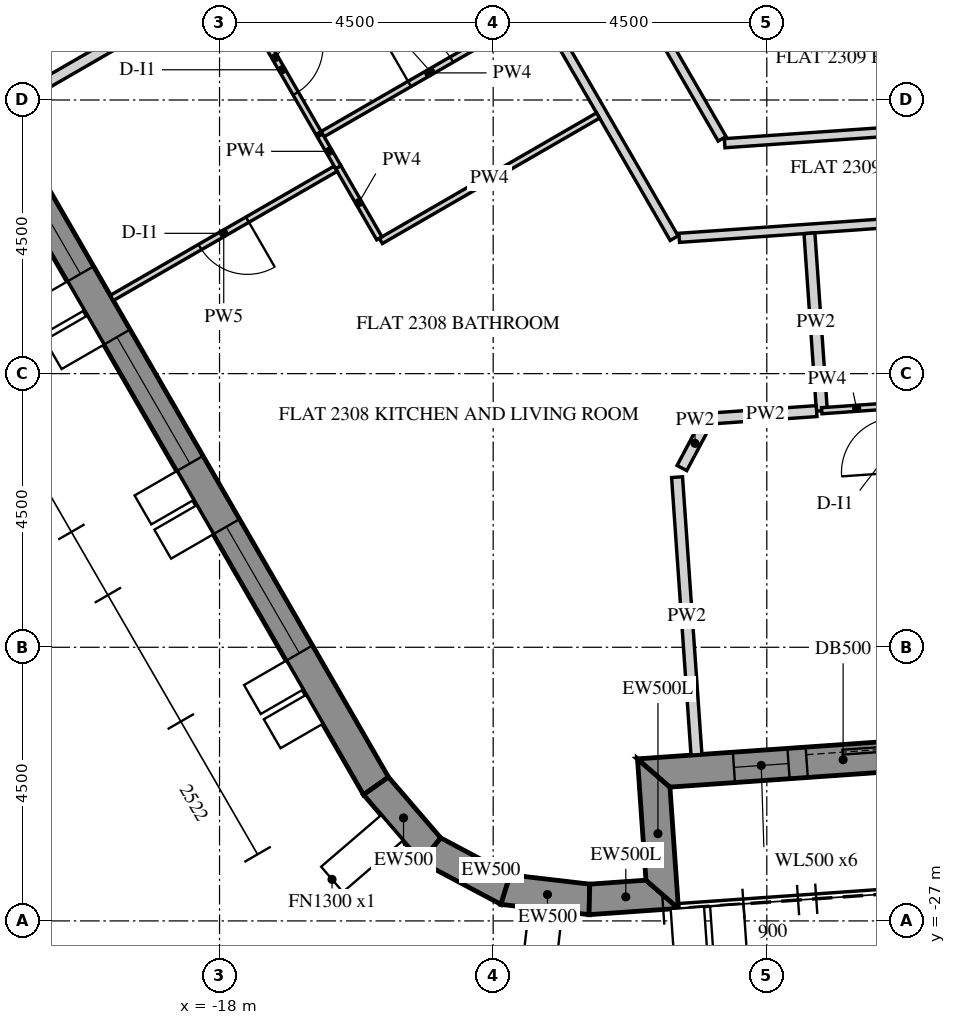
"""IFC4 building model, lengths in metres.
Left out: names, types, materials, properties, quantities, classifications, styles, units other than length and angle.
Written with IfcOpenShell. Run it as: python <this file> out.ifc"""

import sys

from ifc_helpers import new_model, si_unit, direction, frame, frame_2d, origin, place, context, subcontext, project, spatial, polyline, rectangle, outline, extrude, element, fill, save


model = new_model("IFC4")
c1 = context("Model", 3, precision=1e-05, world=origin(), true_north=direction((0.0, 1.0)))
c2 = subcontext(c1, "Body", "Model", "MODEL_VIEW")
j1 = project(units=[si_unit("LENGTHUNIT", "METRE"), si_unit("PLANEANGLEUNIT", "RADIAN")], contexts=[c1])
p1 = place(None, origin())
s1 = spatial("IfcSite", under=j1, at=p1, CompositionType="ELEMENT")
p2 = place(p1, origin())
s2 = spatial("IfcBuilding", under=s1, at=p2, CompositionType="ELEMENT")
p3 = place(p2, frame((0.0, 0.0, 291.3)))
s3 = spatial("IfcBuildingStorey", under=s2, at=p3, CompositionType="ELEMENT", Elevation=291.3)
p4 = place(p3, frame((-28.149, -2.745, -0.15), z_axis=(0.0, 0.0, 1.0), x_axis=(0.500003737743, -0.866023245787, 0.0)))
e1 = element("IfcWall", 1, at=p4, inside=s3, PredefinedType="SOLIDWALL", context=c2, shape_type="SweptSolid", body=[
    extrude(outline(polyline([(-0.021, -0.25), (25.468, -0.25), (25.421, 0.25), (0.021, 0.25), (-0.021, -0.25)])), origin(), (0.0, 0.0, 1.0), 3.9),
])
p5 = place(p4, frame((2.522, 0.0, 0.75)))
e2 = element("IfcOpeningElement", 2, at=p5, cuts=e1, PredefinedType="OPENING", context=c2, shape_type="SweptSolid", body=[
    extrude(rectangle(XDim=2.4, YDim=2.7, at=frame_2d((1.2, 1.35))), frame((0.0, 0.26, 0.0), z_axis=(0.0, -1.0, 0.0), x_axis=(1.0, 0.0, 0.0)), (0.0, 0.0, 1.0), 0.52),
])
p6 = place(p4, frame((6.122, 0.0, 0.75)))
e3 = element("IfcOpeningElement", 3, at=p6, cuts=e1, PredefinedType="OPENING", context=c2, shape_type="SweptSolid", body=[
    extrude(rectangle(XDim=2.4, YDim=2.7, at=frame_2d((1.2, 1.35))), frame((0.0, 0.26, 0.0), z_axis=(0.0, -1.0, 0.0), x_axis=(1.0, 0.0, 0.0)), (0.0, 0.0, 1.0), 0.52),
])
p7 = place(p4, frame((9.722, 0.0, 0.75)))
e4 = element("IfcOpeningElement", 4, at=p7, cuts=e1, PredefinedType="OPENING", context=c2, shape_type="SweptSolid", body=[
    extrude(rectangle(XDim=2.4, YDim=2.7, at=frame_2d((1.2, 1.35))), frame((0.0, 0.26, 0.0), z_axis=(0.0, -1.0, 0.0), x_axis=(1.0, 0.0, 0.0)), (0.0, 0.0, 1.0), 0.52),
])
p8 = place(p4, frame((13.323, 0.0, 0.75)))
e5 = element("IfcOpeningElement", 5, at=p8, cuts=e1, PredefinedType="OPENING", context=c2, shape_type="SweptSolid", body=[
    extrude(rectangle(XDim=2.4, YDim=2.7, at=frame_2d((1.2, 1.35))), frame((0.0, 0.26, 0.0), z_axis=(0.0, -1.0, 0.0), x_axis=(1.0, 0.0, 0.0)), (0.0, 0.0, 1.0), 0.52),
])
p9 = place(p4, frame((16.922, 0.0, 0.75)))
e6 = element("IfcOpeningElement", 6, at=p9, cuts=e1, PredefinedType="OPENING", context=c2, shape_type="SweptSolid", body=[
    extrude(rectangle(XDim=2.4, YDim=2.7, at=frame_2d((1.2, 1.35))), frame((0.0, 0.26, 0.0), z_axis=(0.0, -1.0, 0.0), x_axis=(1.0, 0.0, 0.0)), (0.0, 0.0, 1.0), 0.52),
])
p10 = place(p4, frame((20.522, 0.0, 0.75)))
e7 = element("IfcOpeningElement", 7, at=p10, cuts=e1, PredefinedType="OPENING", context=c2, shape_type="SweptSolid", body=[
    extrude(rectangle(XDim=2.4, YDim=2.7, at=frame_2d((1.2, 1.35))), frame((0.0, 0.26, 0.0), z_axis=(0.0, -1.0, 0.0), x_axis=(1.0, 0.0, 0.0)), (0.0, 0.0, 1.0), 0.52),
])
p11 = place(p3, frame((-15.427, -24.78, -0.15), z_axis=(0.0, 0.0, 1.0), x_axis=(0.651616566281, -0.758548515619, 0.0)))
e8 = element("IfcWall", 8, at=p11, inside=s3, PredefinedType="SOLIDWALL", context=c2, shape_type="SweptSolid", body=[
    extrude(outline(polyline([(-0.023, -0.25), (1.435, -0.25), (1.341, 0.25), (0.023, 0.25), (-0.023, -0.25)])), origin(), (0.0, 0.0, 1.0), 3.9),
])
p12 = place(p3, frame((-14.522, -25.833, -0.15), z_axis=(0.0, 0.0, 1.0), x_axis=(0.882926676147, -0.469510899286, 0.0)))
e9 = element("IfcWall", 9, at=p12, inside=s3, PredefinedType="SOLIDWALL", context=c2, shape_type="SweptSolid", body=[
    extrude(outline(polyline([(-0.047, -0.25), (1.436, -0.25), (1.341, 0.25), (0.047, 0.25), (-0.047, -0.25)])), origin(), (0.0, 0.0, 1.0), 3.9),
])
p13 = place(p3, frame((-13.296, -26.485, -0.15), z_axis=(0.0, 0.0, 1.0), x_axis=(0.993239161627, -0.116086036245, 0.0)))
e10 = element("IfcWall", 10, at=p13, inside=s3, PredefinedType="SOLIDWALL", context=c2, shape_type="SweptSolid", body=[
    extrude(outline(polyline([(-0.047, -0.25), (1.411, -0.25), (1.365, 0.25), (0.047, 0.25), (-0.047, -0.25)])), origin(), (0.0, 0.0, 1.0), 3.9),
])
p14 = place(p3, frame((-11.917, -26.646, -0.15), z_axis=(0.0, 0.0, 1.0), x_axis=(0.997562933087, 0.069772448216, 0.0)))
e11 = element("IfcWall", 11, at=p14, inside=s3, PredefinedType="SOLIDWALL", context=c2, shape_type="SweptSolid", body=[
    extrude(outline(polyline([(-0.023, -0.25), (1.45, -0.25), (0.95, 0.25), (0.023, 0.25), (-0.023, -0.25)])), origin(), (0.0, 0.0, 1.0), 3.9),
])
p15 = place(p3, frame((-10.72, -26.562, -0.15), z_axis=(0.0, 0.0, 1.0), x_axis=(-0.069824268692, 0.99755930726, 0.0)))
e12 = element("IfcWall", 12, at=p15, inside=s3, PredefinedType="SOLIDWALL", context=c2, shape_type="SweptSolid", body=[
    extrude(outline(polyline([(-0.25, -0.25), (1.75, -0.25), (2.25, 0.25), (0.25, 0.25), (-0.25, -0.25)])), origin(), (0.0, 0.0, 1.0), 3.9),
])
p16 = place(p3, frame((-10.86, -24.567, -0.15), z_axis=(0.0, 0.0, 1.0), x_axis=(0.997564329317, 0.06975248292, 0.0)))
e13 = element("IfcWall", 13, at=p16, inside=s3, PredefinedType="SOLIDWALL", context=c2, shape_type="SweptSolid", body=[
    extrude(outline(polyline([(0.25, -0.25), (22.795, -0.25), (23.295, 0.25), (-0.25, 0.25), (0.25, -0.25)])), origin(), (0.0, 0.0, 1.0), 3.9),
])
p17 = place(p16, frame((1.323, 0.0, 1.05)))
e14 = element("IfcOpeningElement", 14, at=p17, cuts=e13, PredefinedType="OPENING", context=c2, shape_type="SweptSolid", body=[
    extrude(rectangle(XDim=0.9, YDim=1.5, at=frame_2d((0.45, 0.75))), frame((0.0, 0.26, 0.0), z_axis=(0.0, -1.0, 0.0), x_axis=(1.0, 0.0, 0.0)), (0.0, 0.0, 1.0), 0.52),
])
p18 = place(p16, frame((2.522, 0.0, 0.15)))
e15 = element("IfcOpeningElement", 15, at=p18, cuts=e13, PredefinedType="OPENING", context=c2, shape_type="SweptSolid", body=[
    extrude(rectangle(XDim=1.2, YDim=2.4, at=frame_2d((0.6, 1.2))), frame((0.0, 0.26, 0.0), z_axis=(0.0, -1.0, 0.0), x_axis=(1.0, 0.0, 0.0)), (0.0, 0.0, 1.0), 0.52),
])
p19 = place(p16, frame((4.922, 0.0, 1.05)))
e16 = element("IfcOpeningElement", 16, at=p19, cuts=e13, PredefinedType="OPENING", context=c2, shape_type="SweptSolid", body=[
    extrude(rectangle(XDim=0.9, YDim=1.5, at=frame_2d((0.45, 0.75))), frame((0.0, 0.26, 0.0), z_axis=(0.0, -1.0, 0.0), x_axis=(1.0, 0.0, 0.0)), (0.0, 0.0, 1.0), 0.52),
])
p20 = place(p16, frame((6.122, 0.0, 0.15)))
e17 = element("IfcOpeningElement", 17, at=p20, cuts=e13, PredefinedType="OPENING", context=c2, shape_type="SweptSolid", body=[
    extrude(rectangle(XDim=1.2, YDim=2.4, at=frame_2d((0.6, 1.2))), frame((0.0, 0.26, 0.0), z_axis=(0.0, -1.0, 0.0), x_axis=(1.0, 0.0, 0.0)), (0.0, 0.0, 1.0), 0.52),
])
p21 = place(p16, frame((8.522, 0.0, 1.05)))
e18 = element("IfcOpeningElement", 18, at=p21, cuts=e13, PredefinedType="OPENING", context=c2, shape_type="SweptSolid", body=[
    extrude(rectangle(XDim=0.9, YDim=1.5, at=frame_2d((0.45, 0.75))), frame((0.0, 0.26, 0.0), z_axis=(0.0, -1.0, 0.0), x_axis=(1.0, 0.0, 0.0)), (0.0, 0.0, 1.0), 0.52),
])
p22 = place(p16, frame((9.722, 0.0, 0.15)))
e19 = element("IfcOpeningElement", 19, at=p22, cuts=e13, PredefinedType="OPENING", context=c2, shape_type="SweptSolid", body=[
    extrude(rectangle(XDim=1.2, YDim=2.4, at=frame_2d((0.6, 1.2))), frame((0.0, 0.26, 0.0), z_axis=(0.0, -1.0, 0.0), x_axis=(1.0, 0.0, 0.0)), (0.0, 0.0, 1.0), 0.52),
])
p23 = place(p16, frame((12.122, 0.0, 1.05)))
e20 = element("IfcOpeningElement", 20, at=p23, cuts=e13, PredefinedType="OPENING", context=c2, shape_type="SweptSolid", body=[
    extrude(rectangle(XDim=0.9, YDim=1.5, at=frame_2d((0.45, 0.75))), frame((0.0, 0.26, 0.0), z_axis=(0.0, -1.0, 0.0), x_axis=(1.0, 0.0, 0.0)), (0.0, 0.0, 1.0), 0.52),
])
p24 = place(p16, frame((13.323, 0.0, 0.15)))
e21 = element("IfcOpeningElement", 21, at=p24, cuts=e13, PredefinedType="OPENING", context=c2, shape_type="SweptSolid", body=[
    extrude(rectangle(XDim=1.2, YDim=2.4, at=frame_2d((0.6, 1.2))), frame((0.0, 0.26, 0.0), z_axis=(0.0, -1.0, 0.0), x_axis=(1.0, 0.0, 0.0)), (0.0, 0.0, 1.0), 0.52),
])
p25 = place(p16, frame((15.722, 0.0, 1.05)))
e22 = element("IfcOpeningElement", 22, at=p25, cuts=e13, PredefinedType="OPENING", context=c2, shape_type="SweptSolid", body=[
    extrude(rectangle(XDim=0.9, YDim=1.5, at=frame_2d((0.45, 0.75))), frame((0.0, 0.26, 0.0), z_axis=(0.0, -1.0, 0.0), x_axis=(1.0, 0.0, 0.0)), (0.0, 0.0, 1.0), 0.52),
])
p26 = place(p16, frame((16.922, 0.0, 0.15)))
e23 = element("IfcOpeningElement", 23, at=p26, cuts=e13, PredefinedType="OPENING", context=c2, shape_type="SweptSolid", body=[
    extrude(rectangle(XDim=1.2, YDim=2.4, at=frame_2d((0.6, 1.2))), frame((0.0, 0.26, 0.0), z_axis=(0.0, -1.0, 0.0), x_axis=(1.0, 0.0, 0.0)), (0.0, 0.0, 1.0), 0.52),
])
p27 = place(p16, frame((19.323, 0.0, 1.05)))
e24 = element("IfcOpeningElement", 24, at=p27, cuts=e13, PredefinedType="OPENING", context=c2, shape_type="SweptSolid", body=[
    extrude(rectangle(XDim=0.9, YDim=1.5, at=frame_2d((0.45, 0.75))), frame((0.0, 0.26, 0.0), z_axis=(0.0, -1.0, 0.0), x_axis=(1.0, 0.0, 0.0)), (0.0, 0.0, 1.0), 0.52),
])
p28 = place(p16, frame((20.522, 0.0, 0.15)))
e25 = element("IfcOpeningElement", 25, at=p28, cuts=e13, PredefinedType="OPENING", context=c2, shape_type="SweptSolid", body=[
    extrude(rectangle(XDim=1.2, YDim=2.4, at=frame_2d((0.6, 1.2))), frame((0.0, 0.26, 0.0), z_axis=(0.0, -1.0, 0.0), x_axis=(1.0, 0.0, 0.0)), (0.0, 0.0, 1.0), 0.52),
])
p29 = place(p3, frame((-17.998, -2.826, 0.0), z_axis=(0.0, 0.0, 1.0), x_axis=(0.500003306199, -0.866023494941, 0.0)))
e26 = element("IfcWall", 26, at=p29, inside=s3, PredefinedType="PARTITIONING", context=c2, shape_type="SweptSolid", body=[
    extrude(rectangle(XDim=14.949, YDim=0.15, at=frame_2d((7.475, 0.0))), origin(), (0.0, 0.0, 1.0), 2.988),
])
p30 = place(p29, frame((2.725, 0.0, 0.0)))
e27 = element("IfcOpeningElement", 27, at=p30, cuts=e26, PredefinedType="OPENING", context=c2, shape_type="SweptSolid", body=[
    extrude(rectangle(XDim=1.0, YDim=2.1, at=frame_2d((0.5, 1.05))), frame((0.0, 0.085, 0.0), z_axis=(0.0, -1.0, 0.0), x_axis=(1.0, 0.0, 0.0)), (0.0, 0.0, 1.0), 0.17),
])
p31 = place(p29, frame((8.576, 0.0, 0.0)))
e28 = element("IfcOpeningElement", 28, at=p31, cuts=e26, PredefinedType="OPENING", context=c2, shape_type="SweptSolid", body=[
    extrude(rectangle(XDim=1.0, YDim=2.1, at=frame_2d((0.5, 1.05))), frame((0.0, 0.085, 0.0), z_axis=(0.0, -1.0, 0.0), x_axis=(1.0, 0.0, 0.0)), (0.0, 0.0, 1.0), 0.17),
])
p32 = place(p3, frame((-10.44, -15.767, 0.0), z_axis=(0.0, 0.0, 1.0), x_axis=(0.997534721961, 0.070174628483, 0.0)))
e29 = element("IfcWall", 29, at=p32, inside=s3, PredefinedType="PARTITIONING", context=c2, shape_type="SweptSolid", body=[
    extrude(rectangle(XDim=16.939, YDim=0.15, at=frame_2d((8.47, 0.0))), origin(), (0.0, 0.0, 1.0), 2.988),
])
p33 = place(p32, frame((4.742, 0.0, 0.0)))
e30 = element("IfcOpeningElement", 30, at=p33, cuts=e29, PredefinedType="OPENING", context=c2, shape_type="SweptSolid", body=[
    extrude(rectangle(XDim=1.0, YDim=2.1, at=frame_2d((0.5, 1.05))), frame((0.0, 0.085, 0.0), z_axis=(0.0, -1.0, 0.0), x_axis=(1.0, 0.0, 0.0)), (0.0, 0.0, 1.0), 0.17),
])
p34 = place(p3, frame((6.884, -13.052, 0.0), z_axis=(0.0, 0.0, 1.0), x_axis=(-0.997564224443, -0.069753982764, 0.0)))
e31 = element("IfcWall", 31, at=p34, inside=s3, PredefinedType="PARTITIONING", context=c2, shape_type="SweptSolid", body=[
    extrude(rectangle(XDim=16.618, YDim=0.15, at=frame_2d((8.309, 0.0))), origin(), (0.0, 0.0, 1.0), 2.988),
])
p35 = place(p34, frame((7.859, 0.0, 0.0)))
e32 = element("IfcOpeningElement", 32, at=p35, cuts=e31, PredefinedType="OPENING", context=c2, shape_type="SweptSolid", body=[
    extrude(rectangle(XDim=0.9, YDim=2.1, at=frame_2d((0.45, 1.05))), frame((0.0, 0.085, 0.0), z_axis=(0.0, -1.0, 0.0), x_axis=(1.0, 0.0, 0.0)), (0.0, 0.0, 1.0), 0.17),
])
p36 = place(p3, frame((-9.735, -14.138, 0.0), z_axis=(0.0, 0.0, 1.0), x_axis=(-0.500018385592, 0.866014788598, 0.0)))
e33 = element("IfcWall", 33, at=p36, inside=s3, PredefinedType="PARTITIONING", context=c2, shape_type="SweptSolid", body=[
    extrude(rectangle(XDim=6.356, YDim=0.15, at=frame_2d((3.178, 0.0))), origin(), (0.0, 0.0, 1.0), 2.988),
])
p37 = place(p3, frame((-21.571, -13.637, 0.0), z_axis=(0.0, 0.0, 1.0), x_axis=(0.866034063461, 0.499985000701, 0.0)))
e34 = element("IfcWall", 34, at=p37, inside=s3, PredefinedType="PARTITIONING", context=c2, shape_type="SweptSolid", body=[
    extrude(rectangle(XDim=8.425, YDim=0.18, at=frame_2d((4.212, 0.0))), origin(), (0.0, 0.0, 1.0), 2.988),
])
p38 = place(p3, frame((-11.775, -13.755, 0.0), z_axis=(0.0, 0.0, 1.0), x_axis=(-0.866034795751, -0.499983732284, 0.0)))
e35 = element("IfcWall", 35, at=p38, inside=s3, PredefinedType="PARTITIONING", context=c2, shape_type="SweptSolid", body=[
    extrude(rectangle(XDim=4.125, YDim=0.1, at=frame_2d((2.062, 0.0))), origin(), (0.0, 0.0, 1.0), 2.988),
])
p39 = place(p3, frame((-15.372, -15.774, 0.0), z_axis=(0.0, 0.0, 1.0), x_axis=(-0.500003806764, 0.866023205937, 0.0)))
e36 = element("IfcWall", 36, at=p39, inside=s3, PredefinedType="PARTITIONING", context=c2, shape_type="SweptSolid", body=[
    extrude(rectangle(XDim=1.352, YDim=0.1, at=frame_2d((0.676, 0.0))), origin(), (0.0, 0.0, 1.0), 2.988),
])
p40 = place(p3, frame((-16.091, -14.63, 0.0), z_axis=(0.0, 0.0, 1.0), x_axis=(-0.866028703517, -0.499994284652, 0.0)))
e37 = element("IfcWall", 37, at=p40, inside=s3, PredefinedType="PARTITIONING", context=c2, shape_type="SweptSolid", body=[
    extrude(rectangle(XDim=4.25, YDim=0.1, at=frame_2d((2.125, 0.0))), origin(), (0.0, 0.0, 1.0), 2.988),
])
p41 = place(p40, frame((1.675, 0.0, 0.0)))
e38 = element("IfcOpeningElement", 38, at=p41, cuts=e37, PredefinedType="OPENING", context=c2, shape_type="SweptSolid", body=[
    extrude(rectangle(XDim=0.9, YDim=2.1, at=frame_2d((0.45, 1.05))), frame((0.0, 0.06, 0.0), z_axis=(0.0, -1.0, 0.0), x_axis=(1.0, 0.0, 0.0)), (0.0, 0.0, 1.0), 0.12),
])
p42 = place(p3, frame((-8.094, -18.61, 0.0), z_axis=(0.0, 0.0, 1.0), x_axis=(-0.069781781132, 0.997562280272, 0.0)))
e39 = element("IfcWall", 39, at=p42, inside=s3, PredefinedType="PARTITIONING", context=c2, shape_type="SweptSolid", body=[
    extrude(rectangle(XDim=2.925, YDim=0.18, at=frame_2d((1.462, 0.0))), origin(), (0.0, 0.0, 1.0), 2.988),
])
p43 = place(p3, frame((-10.157, -24.268, 0.0), z_axis=(0.0, 0.0, 1.0), x_axis=(-0.069722955951, 0.997566393486, 0.0)))
e40 = element("IfcWall", 40, at=p43, inside=s3, PredefinedType="PARTITIONING", context=c2, shape_type="SweptSolid", body=[
    extrude(rectangle(XDim=4.577, YDim=0.18, at=frame_2d((2.288, 0.0))), origin(), (0.0, 0.0, 1.0), 2.988),
])
p44 = place(p3, frame((-10.396, -19.552, 0.0), z_axis=(0.0, 0.0, 1.0), x_axis=(0.469595353143, 0.882881761226, 0.0)))
e41 = element("IfcWall", 41, at=p44, inside=s3, PredefinedType="PARTITIONING", context=c2, shape_type="SweptSolid", body=[
    extrude(rectangle(XDim=0.919, YDim=0.18, at=frame_2d((0.459, 0.0))), origin(), (0.0, 0.0, 1.0), 2.988),
])
p45 = place(p3, frame((-9.859, -18.733, 0.0), z_axis=(0.0, 0.0, 1.0), x_axis=(0.997559371599, 0.069823349496, 0.0)))
e42 = element("IfcWall", 42, at=p45, inside=s3, PredefinedType="PARTITIONING", context=c2, shape_type="SweptSolid", body=[
    extrude(rectangle(XDim=1.682, YDim=0.18, at=frame_2d((0.841, 0.0))), origin(), (0.0, 0.0, 1.0), 2.988),
])
p46 = place(p3, frame((-16.347, -14.085, 0.0), z_axis=(0.0, 0.0, 1.0), x_axis=(0.866034795751, 0.499983732284, 0.0)))
e43 = element("IfcWall", 43, at=p46, inside=s3, PredefinedType="PARTITIONING", context=c2, shape_type="SweptSolid", body=[
    extrude(rectangle(XDim=4.125, YDim=0.1, at=frame_2d((2.062, 0.0))), origin(), (0.0, 0.0, 1.0), 2.988),
])
p47 = place(p46, frame((1.7, 0.0, 0.0)))
e44 = element("IfcOpeningElement", 44, at=p47, cuts=e43, PredefinedType="OPENING", context=c2, shape_type="SweptSolid", body=[
    extrude(rectangle(XDim=0.8, YDim=2.1, at=frame_2d((0.4, 1.05))), frame((0.0, 0.06, 0.0), z_axis=(0.0, -1.0, 0.0), x_axis=(1.0, 0.0, 0.0)), (0.0, 0.0, 1.0), 0.12),
])
p48 = place(p3, frame((-17.802, -11.565, 0.0), z_axis=(0.0, 0.0, 1.0), x_axis=(0.499983369373, -0.866035005268, 0.0)))
e45 = element("IfcWall", 45, at=p48, inside=s3, PredefinedType="PARTITIONING", context=c2, shape_type="SweptSolid", body=[
    extrude(rectangle(XDim=2.862, YDim=0.1, at=frame_2d((1.431, 0.0))), origin(), (0.0, 0.0, 1.0), 2.988),
])
p49 = place(p48, frame((0.15, 0.0, 0.0)))
e46 = element("IfcOpeningElement", 46, at=p49, cuts=e45, PredefinedType="OPENING", context=c2, shape_type="SweptSolid", body=[
    extrude(rectangle(XDim=0.9, YDim=2.1, at=frame_2d((0.45, 1.05))), frame((0.0, 0.06, 0.0), z_axis=(0.0, -1.0, 0.0), x_axis=(1.0, 0.0, 0.0)), (0.0, 0.0, 1.0), 0.12),
])
p50 = place(p48, frame((1.21, 0.0, 0.0)))
e47 = element("IfcOpeningElement", 47, at=p50, cuts=e45, PredefinedType="OPENING", context=c2, shape_type="SweptSolid", body=[
    extrude(rectangle(XDim=0.9, YDim=2.1, at=frame_2d((0.45, 1.05))), frame((0.0, 0.06, 0.0), z_axis=(0.0, -1.0, 0.0), x_axis=(1.0, 0.0, 0.0)), (0.0, 0.0, 1.0), 0.12),
])
p51 = place(p3, frame((-16.348, -14.084, 0.0), z_axis=(0.0, 0.0, 1.0), x_axis=(0.499933044277, -0.866064057238, 0.0)))
e48 = element("IfcWall", 48, at=p51, inside=s3, PredefinedType="PARTITIONING", context=c2, shape_type="SweptSolid", body=[
    extrude(rectangle(XDim=0.602, YDim=0.1, at=frame_2d((0.301, 0.0))), origin(), (0.0, 0.0, 1.0), 2.988),
])
p52 = place(p3, frame((-8.097, -18.61, 0.0), z_axis=(0.0, 0.0, 1.0), x_axis=(0.99756000175, 0.069814346006, 0.0)))
e49 = element("IfcWall", 49, at=p52, inside=s3, PredefinedType="PARTITIONING", context=c2, shape_type="SweptSolid", body=[
    extrude(rectangle(XDim=1.15, YDim=0.1, at=frame_2d((0.575, 0.0))), origin(), (0.0, 0.0, 1.0), 2.988),
])
p53 = place(p8, frame((0.0, 0.18, 0.0)))
e50 = element("IfcWindow", 50, at=p53, inside=s3, PartitioningType="DOUBLE_PANEL_VERTICAL", PredefinedType="WINDOW", context=c2, shape_type="SweptSolid", body=[
    extrude(rectangle(XDim=2.4, YDim=2.7, at=frame_2d((1.2, 1.35))), frame((0.0, 0.03, 0.0), z_axis=(0.0, -1.0, 0.0), x_axis=(1.0, 0.0, 0.0)), (0.0, 0.0, 1.0), 0.06),
])
fill(e5, e50)
p54 = place(p9, frame((0.0, 0.18, 0.0)))
e51 = element("IfcWindow", 51, at=p54, inside=s3, PartitioningType="DOUBLE_PANEL_VERTICAL", PredefinedType="WINDOW", context=c2, shape_type="SweptSolid", body=[
    extrude(rectangle(XDim=2.4, YDim=2.7, at=frame_2d((1.2, 1.35))), frame((0.0, 0.03, 0.0), z_axis=(0.0, -1.0, 0.0), x_axis=(1.0, 0.0, 0.0)), (0.0, 0.0, 1.0), 0.06),
])
fill(e6, e51)
p55 = place(p10, frame((0.0, 0.18, 0.0)))
e52 = element("IfcWindow", 52, at=p55, inside=s3, PartitioningType="DOUBLE_PANEL_VERTICAL", PredefinedType="WINDOW", context=c2, shape_type="SweptSolid", body=[
    extrude(rectangle(XDim=2.4, YDim=2.7, at=frame_2d((1.2, 1.35))), frame((0.0, 0.03, 0.0), z_axis=(0.0, -1.0, 0.0), x_axis=(1.0, 0.0, 0.0)), (0.0, 0.0, 1.0), 0.06),
])
fill(e7, e52)
p56 = place(p17, frame((0.0, 0.18, 0.0)))
e53 = element("IfcWindow", 53, at=p56, inside=s3, PartitioningType="SINGLE_PANEL", PredefinedType="WINDOW", context=c2, shape_type="SweptSolid", body=[
    extrude(rectangle(XDim=0.9, YDim=1.5, at=frame_2d((0.45, 0.75))), frame((0.0, 0.03, 0.0), z_axis=(0.0, -1.0, 0.0), x_axis=(1.0, 0.0, 0.0)), (0.0, 0.0, 1.0), 0.06),
])
fill(e14, e53)
p57 = place(p18, frame((0.0, 0.175, 0.0)))
e54 = element("IfcDoor", 54, at=p57, inside=s3, OperationType="SLIDING_TO_LEFT", PredefinedType="DOOR", context=c2, shape_type="SweptSolid", body=[
    extrude(rectangle(XDim=1.2, YDim=2.4, at=frame_2d((0.6, 1.2))), frame((0.0, 0.025, 0.0), z_axis=(0.0, -1.0, 0.0), x_axis=(1.0, 0.0, 0.0)), (0.0, 0.0, 1.0), 0.05),
])
fill(e15, e54)
p58 = place(p47, origin())
e55 = element("IfcDoor", 55, at=p58, inside=s3, OperationType="SINGLE_SWING_LEFT", PredefinedType="DOOR", context=c2, shape_type="SweptSolid", body=[
    extrude(rectangle(XDim=0.8, YDim=2.1, at=frame_2d((0.4, 1.05))), frame((0.0, 0.025, 0.0), z_axis=(0.0, -1.0, 0.0), x_axis=(1.0, 0.0, 0.0)), (0.0, 0.0, 1.0), 0.05),
])
fill(e44, e55)
p59 = place(p50, origin())
e56 = element("IfcDoor", 56, at=p59, inside=s3, OperationType="SINGLE_SWING_LEFT", PredefinedType="DOOR", context=c2, shape_type="SweptSolid", body=[
    extrude(rectangle(XDim=0.9, YDim=2.1, at=frame_2d((0.45, 1.05))), frame((0.0, 0.025, 0.0), z_axis=(0.0, -1.0, 0.0), x_axis=(1.0, 0.0, 0.0)), (0.0, 0.0, 1.0), 0.05),
])
fill(e47, e56)
p60 = place(p41, origin())
e57 = element("IfcDoor", 57, at=p60, inside=s3, OperationType="SINGLE_SWING_LEFT", PredefinedType="DOOR", context=c2, shape_type="SweptSolid", body=[
    extrude(rectangle(XDim=0.9, YDim=2.1, at=frame_2d((0.45, 1.05))), frame((0.0, 0.025, 0.0), z_axis=(0.0, -1.0, 0.0), x_axis=(1.0, 0.0, 0.0)), (0.0, 0.0, 1.0), 0.05),
])
fill(e38, e57)
save(model, sys.argv[1])
